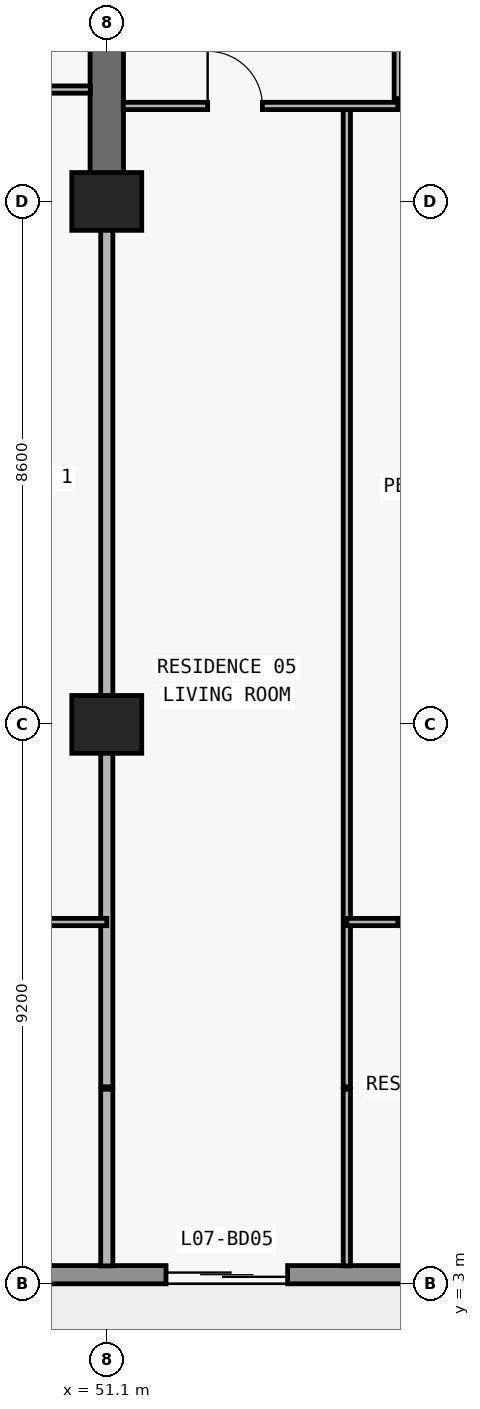
"""IFC4 building model, lengths in metres.
Left out: names, types, materials, properties, quantities, classifications, styles, units other than length and angle.
Written with IfcOpenShell. Run it as: python <this file> out.ifc"""

import sys

from ifc_helpers import new_model, si_unit, direction, frame, frame_2d, origin, origin_2d, place, context, subcontext, project, spatial, rectangle, extrude, element, fill, save


model = new_model("IFC4")
c1 = context("Model", 3, precision=1e-05, world=origin(), true_north=direction((0.0, 1.0)))
c2 = subcontext(c1, "Body", "Model", "MODEL_VIEW")
j1 = project(units=[si_unit("LENGTHUNIT", "METRE"), si_unit("PLANEANGLEUNIT", "RADIAN")], contexts=[c1])
p1 = place(None, origin())
s1 = spatial("IfcSite", under=j1, at=p1, CompositionType="ELEMENT")
p2 = place(p1, origin())
s2 = spatial("IfcBuilding", under=s1, at=p2, CompositionType="ELEMENT")
p3 = place(p2, frame((0.0, 0.0, 33.3)))
s3 = spatial("IfcBuildingStorey", under=s2, at=p3, CompositionType="ELEMENT", Elevation=33.3)
for number, where, z_axis, x_axis in (
    (1, (51.1, 12.2, 0.0), (0.0, 0.0, 1.0), (1.0, 0.0, 0.0)),
    (2, (51.1, 20.8, 0.0), (0.0, 0.0, 1.0), (1.0, 0.0, 0.0)),
):
    element("IfcColumn", number, at=place(p3, frame(where, z_axis=z_axis, x_axis=x_axis)), inside=s3, PredefinedType="COLUMN", context=c2, shape_type="SweptSolid", body=[
        extrude(rectangle(XDim=1.15, YDim=0.95, at=origin_2d()), origin(), (0.0, 0.0, 1.0), 3.05),
    ])
p4 = place(p3, frame((51.1, 20.8, 0.0), z_axis=(0.0, 0.0, 1.0), x_axis=(0.0, 1.0, 0.0)))
e3 = element("IfcWall", 3, at=p4, inside=s3, PredefinedType="SHEAR", context=c2, shape_type="SweptSolid", body=[
    extrude(rectangle(XDim=8.6, YDim=0.55, at=frame_2d((4.3, 0.0))), origin(), (0.0, 0.0, 1.0), 3.05),
])
p5 = place(p3, frame((72.7, 3.15, 0.0), z_axis=(0.0, 0.0, 1.0), x_axis=(-1.0, 0.0, 0.0)))
e4 = element("IfcWall", 4, at=p5, inside=s3, PredefinedType="STANDARD", context=c2, shape_type="SweptSolid", body=[
    extrude(rectangle(XDim=67.6, YDim=0.3, at=frame_2d((33.8, 0.0))), origin(), (0.0, 0.0, 1.0), 3.05),
])
p6 = place(p5, frame((59.826, 0.0, 0.0)))
e5 = element("IfcOpeningElement", 5, at=p6, cuts=e4, PredefinedType="OPENING", context=c2, shape_type="SweptSolid", body=[
    extrude(rectangle(XDim=2.0, YDim=2.3, at=frame_2d((1.0, 1.15))), frame((0.0, 0.16, 0.0), z_axis=(0.0, -1.0, 0.0), x_axis=(1.0, 0.0, 0.0)), (0.0, 0.0, 1.0), 0.32),
])
p7 = place(p5, frame((55.526, 0.0, 0.85)))
e6 = element("IfcOpeningElement", 6, at=p7, cuts=e4, PredefinedType="OPENING", context=c2, shape_type="SweptSolid", body=[
    extrude(rectangle(XDim=2.2, YDim=1.55, at=frame_2d((1.1, 0.775))), frame((0.0, 0.16, 0.0), z_axis=(0.0, -1.0, 0.0), x_axis=(1.0, 0.0, 0.0)), (0.0, 0.0, 1.0), 0.32),
])
p8 = place(p5, frame((51.09, 0.0, 0.0)))
e7 = element("IfcOpeningElement", 7, at=p8, cuts=e4, PredefinedType="OPENING", context=c2, shape_type="SweptSolid", body=[
    extrude(rectangle(XDim=2.0, YDim=2.3, at=frame_2d((1.0, 1.15))), frame((0.0, 0.16, 0.0), z_axis=(0.0, -1.0, 0.0), x_axis=(1.0, 0.0, 0.0)), (0.0, 0.0, 1.0), 0.32),
])
p9 = place(p5, frame((46.99, 0.0, 0.85)))
e8 = element("IfcOpeningElement", 8, at=p9, cuts=e4, PredefinedType="OPENING", context=c2, shape_type="SweptSolid", body=[
    extrude(rectangle(XDim=1.8, YDim=1.55, at=frame_2d((0.9, 0.775))), frame((0.0, 0.16, 0.0), z_axis=(0.0, -1.0, 0.0), x_axis=(1.0, 0.0, 0.0)), (0.0, 0.0, 1.0), 0.32),
])
p10 = place(p5, frame((43.026, 0.0, 0.0)))
e9 = element("IfcOpeningElement", 9, at=p10, cuts=e4, PredefinedType="OPENING", context=c2, shape_type="SweptSolid", body=[
    extrude(rectangle(XDim=2.0, YDim=2.3, at=frame_2d((1.0, 1.15))), frame((0.0, 0.16, 0.0), z_axis=(0.0, -1.0, 0.0), x_axis=(1.0, 0.0, 0.0)), (0.0, 0.0, 1.0), 0.32),
])
p11 = place(p5, frame((38.726, 0.0, 0.85)))
e10 = element("IfcOpeningElement", 10, at=p11, cuts=e4, PredefinedType="OPENING", context=c2, shape_type="SweptSolid", body=[
    extrude(rectangle(XDim=2.2, YDim=1.55, at=frame_2d((1.1, 0.775))), frame((0.0, 0.16, 0.0), z_axis=(0.0, -1.0, 0.0), x_axis=(1.0, 0.0, 0.0)), (0.0, 0.0, 1.0), 0.32),
])
p12 = place(p5, frame((34.69, 0.0, 0.0)))
e11 = element("IfcOpeningElement", 11, at=p12, cuts=e4, PredefinedType="OPENING", context=c2, shape_type="SweptSolid", body=[
    extrude(rectangle(XDim=2.0, YDim=2.3, at=frame_2d((1.0, 1.15))), frame((0.0, 0.16, 0.0), z_axis=(0.0, -1.0, 0.0), x_axis=(1.0, 0.0, 0.0)), (0.0, 0.0, 1.0), 0.32),
])
p13 = place(p5, frame((30.81, 0.0, 0.65)))
e12 = element("IfcOpeningElement", 12, at=p13, cuts=e4, PredefinedType="OPENING", context=c2, shape_type="SweptSolid", body=[
    extrude(rectangle(XDim=2.6, YDim=1.85, at=frame_2d((1.3, 0.925))), frame((0.0, 0.16, 0.0), z_axis=(0.0, -1.0, 0.0), x_axis=(1.0, 0.0, 0.0)), (0.0, 0.0, 1.0), 0.32),
])
p14 = place(p5, frame((24.7, 0.0, 0.85)))
e13 = element("IfcOpeningElement", 13, at=p14, cuts=e4, PredefinedType="OPENING", context=c2, shape_type="SweptSolid", body=[
    extrude(rectangle(XDim=2.2, YDim=1.55, at=frame_2d((1.1, 0.775))), frame((0.0, 0.16, 0.0), z_axis=(0.0, -1.0, 0.0), x_axis=(1.0, 0.0, 0.0)), (0.0, 0.0, 1.0), 0.32),
])
p15 = place(p5, frame((18.626, 0.0, 0.0)))
e14 = element("IfcOpeningElement", 14, at=p15, cuts=e4, PredefinedType="OPENING", context=c2, shape_type="SweptSolid", body=[
    extrude(rectangle(XDim=2.0, YDim=2.3, at=frame_2d((1.0, 1.15))), frame((0.0, 0.16, 0.0), z_axis=(0.0, -1.0, 0.0), x_axis=(1.0, 0.0, 0.0)), (0.0, 0.0, 1.0), 0.32),
])
p16 = place(p5, frame((14.326, 0.0, 0.85)))
e15 = element("IfcOpeningElement", 15, at=p16, cuts=e4, PredefinedType="OPENING", context=c2, shape_type="SweptSolid", body=[
    extrude(rectangle(XDim=2.2, YDim=1.55, at=frame_2d((1.1, 0.775))), frame((0.0, 0.16, 0.0), z_axis=(0.0, -1.0, 0.0), x_axis=(1.0, 0.0, 0.0)), (0.0, 0.0, 1.0), 0.32),
])
p17 = place(p5, frame((9.89, 0.0, 0.0)))
e16 = element("IfcOpeningElement", 16, at=p17, cuts=e4, PredefinedType="OPENING", context=c2, shape_type="SweptSolid", body=[
    extrude(rectangle(XDim=2.0, YDim=2.3, at=frame_2d((1.0, 1.15))), frame((0.0, 0.16, 0.0), z_axis=(0.0, -1.0, 0.0), x_axis=(1.0, 0.0, 0.0)), (0.0, 0.0, 1.0), 0.32),
])
p18 = place(p5, frame((5.79, 0.0, 0.85)))
e17 = element("IfcOpeningElement", 17, at=p18, cuts=e4, PredefinedType="OPENING", context=c2, shape_type="SweptSolid", body=[
    extrude(rectangle(XDim=1.8, YDim=1.55, at=frame_2d((0.9, 0.775))), frame((0.0, 0.16, 0.0), z_axis=(0.0, -1.0, 0.0), x_axis=(1.0, 0.0, 0.0)), (0.0, 0.0, 1.0), 0.32),
])
p19 = place(p3, frame((51.1, 3.295, 0.0), z_axis=(0.0, 0.0, 1.0), x_axis=(0.0, 1.0, 0.0)))
e18 = element("IfcWall", 18, at=p19, inside=s3, PredefinedType="PARTITIONING", context=c2, shape_type="SweptSolid", body=[
    extrude(rectangle(XDim=2.905, YDim=0.2, at=frame_2d((1.453, 0.0))), origin(), (0.0, 0.0, 1.0), 3.05),
])
p20 = place(p3, frame((51.1, 6.24, 0.0), z_axis=(0.0, 0.0, 1.0), x_axis=(0.0, 1.0, 0.0)))
e19 = element("IfcWall", 19, at=p20, inside=s3, PredefinedType="PARTITIONING", context=c2, shape_type="SweptSolid", body=[
    extrude(rectangle(XDim=14.555, YDim=0.2, at=frame_2d((7.277, 0.0))), origin(), (0.0, 0.0, 1.0), 2.11),
])
p21 = place(p3, frame((55.048, 3.295, 0.0), z_axis=(0.0, 0.0, 1.0), x_axis=(0.0, 1.0, 0.0)))
e20 = element("IfcWall", 20, at=p21, inside=s3, PredefinedType="PARTITIONING", context=c2, shape_type="SweptSolid", body=[
    extrude(rectangle(XDim=2.905, YDim=0.12, at=frame_2d((1.453, 0.0))), origin(), (0.0, 0.0, 1.0), 3.05),
])
p22 = place(p3, frame((55.048, 6.24, 0.0), z_axis=(0.0, 0.0, 1.0), x_axis=(0.0, 1.0, 0.0)))
e21 = element("IfcWall", 21, at=p22, inside=s3, PredefinedType="PARTITIONING", context=c2, shape_type="SweptSolid", body=[
    extrude(rectangle(XDim=16.13, YDim=0.12, at=frame_2d((8.065, 0.0))), origin(), (0.0, 0.0, 1.0), 3.05),
])
p23 = place(p3, frame((55.886, 22.49, 0.0), z_axis=(0.0, 0.0, 1.0), x_axis=(0.0, 1.0, 0.0)))
e22 = element("IfcWall", 22, at=p23, inside=s3, PredefinedType="PARTITIONING", context=c2, shape_type="SweptSolid", body=[
    extrude(rectangle(XDim=4.69, YDim=0.12, at=frame_2d((2.345, 0.0))), origin(), (0.0, 0.0, 1.0), 3.05),
])
p24 = place(p23, frame((1.895, 0.0, 0.0)))
e23 = element("IfcOpeningElement", 23, at=p24, cuts=e22, PredefinedType="OPENING", context=c2, shape_type="SweptSolid", body=[
    extrude(rectangle(XDim=0.9, YDim=2.15, at=frame_2d((0.45, 1.075))), frame((0.0, 0.07, 0.0), z_axis=(0.0, -1.0, 0.0), x_axis=(1.0, 0.0, 0.0)), (0.0, 0.0, 1.0), 0.14),
])
p25 = place(p3, frame((42.7, 8.95, 0.0), z_axis=(0.0, 0.0, 1.0), x_axis=(1.0, 0.0, 0.0)))
e24 = element("IfcWall", 24, at=p25, inside=s3, PredefinedType="PARTITIONING", context=c2, shape_type="SweptSolid", body=[
    extrude(rectangle(XDim=8.4, YDim=0.12, at=frame_2d((4.2, 0.0))), origin(), (0.0, 0.0, 1.0), 3.05),
])
p26 = place(p25, frame((3.75, 0.0, 0.0)))
e25 = element("IfcOpeningElement", 25, at=p26, cuts=e24, PredefinedType="OPENING", context=c2, shape_type="SweptSolid", body=[
    extrude(rectangle(XDim=0.9, YDim=2.15, at=frame_2d((0.45, 1.075))), frame((0.0, 0.07, 0.0), z_axis=(0.0, -1.0, 0.0), x_axis=(1.0, 0.0, 0.0)), (0.0, 0.0, 1.0), 0.14),
])
p27 = place(p3, frame((55.048, 8.95, 0.0), z_axis=(0.0, 0.0, 1.0), x_axis=(1.0, 0.0, 0.0)))
e26 = element("IfcWall", 26, at=p27, inside=s3, PredefinedType="PARTITIONING", context=c2, shape_type="SweptSolid", body=[
    extrude(rectangle(XDim=0.838, YDim=0.12, at=frame_2d((0.419, 0.0))), origin(), (0.0, 0.0, 1.0), 3.05),
])
p28 = place(p3, frame((55.9, 8.95, 0.0), z_axis=(0.0, 0.0, 1.0), x_axis=(1.0, 0.0, 0.0)))
e27 = element("IfcWall", 27, at=p28, inside=s3, PredefinedType="PARTITIONING", context=c2, shape_type="SweptSolid", body=[
    extrude(rectangle(XDim=3.6, YDim=0.12, at=frame_2d((1.8, 0.0))), origin(), (0.0, 0.0, 1.0), 3.05),
])
p29 = place(p28, frame((1.35, 0.0, 0.0)))
e28 = element("IfcOpeningElement", 28, at=p29, cuts=e27, PredefinedType="OPENING", context=c2, shape_type="SweptSolid", body=[
    extrude(rectangle(XDim=0.9, YDim=2.15, at=frame_2d((0.45, 1.075))), frame((0.0, 0.07, 0.0), z_axis=(0.0, -1.0, 0.0), x_axis=(1.0, 0.0, 0.0)), (0.0, 0.0, 1.0), 0.14),
])
p30 = place(p3, frame((51.37, 22.37, 0.0), z_axis=(0.0, 0.0, 1.0), x_axis=(1.0, 0.0, 0.0)))
e29 = element("IfcWall", 29, at=p30, inside=s3, PredefinedType="PARTITIONING", context=c2, shape_type="SweptSolid", body=[
    extrude(rectangle(XDim=4.516, YDim=0.12, at=frame_2d((2.258, 0.0))), origin(), (0.0, 0.0, 1.0), 3.05),
])
p31 = place(p30, frame((1.389, 0.0, 0.0)))
e30 = element("IfcOpeningElement", 30, at=p31, cuts=e29, PredefinedType="OPENING", context=c2, shape_type="SweptSolid", body=[
    extrude(rectangle(XDim=0.9, YDim=2.15, at=frame_2d((0.45, 1.075))), frame((0.0, 0.07, 0.0), z_axis=(0.0, -1.0, 0.0), x_axis=(1.0, 0.0, 0.0)), (0.0, 0.0, 1.0), 0.14),
])
p32 = place(p3, frame((55.9, 22.37, 0.0), z_axis=(0.0, 0.0, 1.0), x_axis=(1.0, 0.0, 0.0)))
e31 = element("IfcWall", 31, at=p32, inside=s3, PredefinedType="PARTITIONING", context=c2, shape_type="SweptSolid", body=[
    extrude(rectangle(XDim=3.6, YDim=0.12, at=frame_2d((1.8, 0.0))), origin(), (0.0, 0.0, 1.0), 3.05),
])
p33 = place(p32, frame((1.35, 0.0, 0.0)))
e32 = element("IfcOpeningElement", 32, at=p33, cuts=e31, PredefinedType="OPENING", context=c2, shape_type="SweptSolid", body=[
    extrude(rectangle(XDim=0.9, YDim=2.15, at=frame_2d((0.45, 1.075))), frame((0.0, 0.07, 0.0), z_axis=(0.0, -1.0, 0.0), x_axis=(1.0, 0.0, 0.0)), (0.0, 0.0, 1.0), 0.14),
])
p34 = place(p3, frame((42.705, 22.64, 0.0), z_axis=(0.0, 0.0, 1.0), x_axis=(1.0, 0.0, 0.0)))
e33 = element("IfcWall", 33, at=p34, inside=s3, PredefinedType="PARTITIONING", context=c2, shape_type="SweptSolid", body=[
    extrude(rectangle(XDim=8.125, YDim=0.12, at=frame_2d((4.062, 0.0))), origin(), (0.0, 0.0, 1.0), 3.05),
])
p35 = place(p34, frame((3.613, 0.0, 0.0)))
e34 = element("IfcOpeningElement", 34, at=p35, cuts=e33, PredefinedType="OPENING", context=c2, shape_type="SweptSolid", body=[
    extrude(rectangle(XDim=0.9, YDim=2.15, at=frame_2d((0.45, 1.075))), frame((0.0, 0.07, 0.0), z_axis=(0.0, -1.0, 0.0), x_axis=(1.0, 0.0, 0.0)), (0.0, 0.0, 1.0), 0.14),
])
p36 = place(p15, origin())
e35 = element("IfcDoor", 35, at=p36, inside=s3, OperationType="DOUBLE_DOOR_SLIDING", PredefinedType="DOOR", context=c2, shape_type="SweptSolid", body=[
    extrude(rectangle(XDim=2.0, YDim=2.3, at=frame_2d((1.0, 1.15))), frame((0.0, 0.025, 0.0), z_axis=(0.0, -1.0, 0.0), x_axis=(1.0, 0.0, 0.0)), (0.0, 0.0, 1.0), 0.05),
])
fill(e14, e35)
p37 = place(p31, origin())
e36 = element("IfcDoor", 36, at=p37, inside=s3, OperationType="SINGLE_SWING_LEFT", PredefinedType="DOOR", context=c2, shape_type="SweptSolid", body=[
    extrude(rectangle(XDim=0.9, YDim=2.15, at=frame_2d((0.45, 1.075))), frame((0.0, 0.025, 0.0), z_axis=(0.0, -1.0, 0.0), x_axis=(1.0, 0.0, 0.0)), (0.0, 0.0, 1.0), 0.05),
])
fill(e30, e36)
save(model, sys.argv[1])
